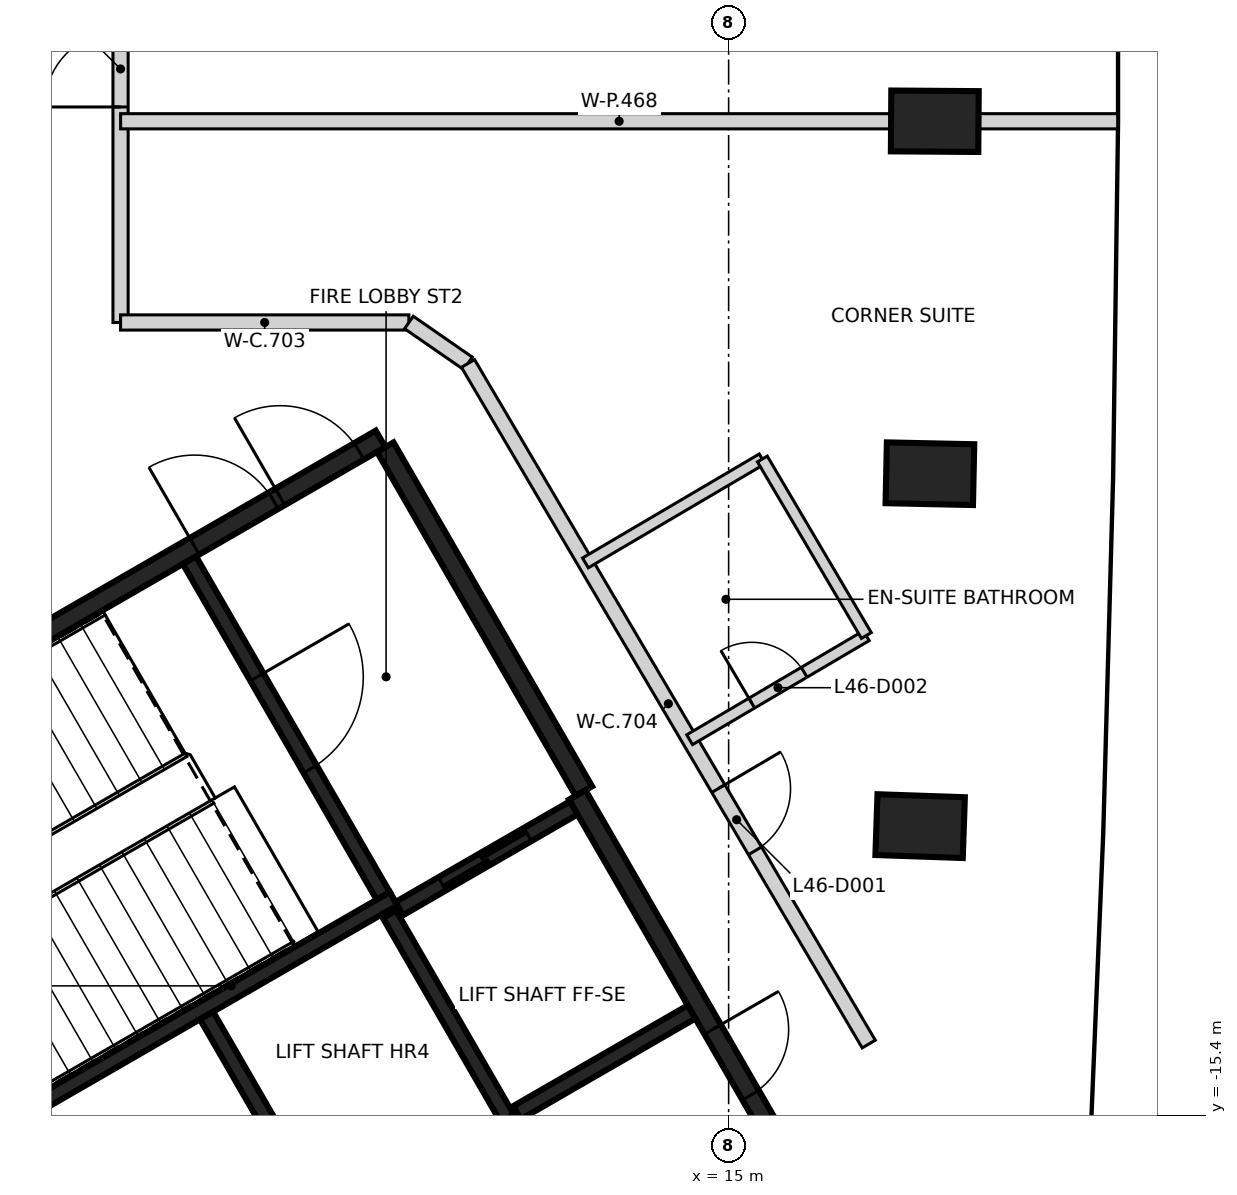
"""IFC4 building model, lengths in metres.
Left out: names, types, materials, properties, quantities, classifications, styles, units other than length and angle.
Written with IfcOpenShell. Run it as: python <this file> out.ifc"""

import sys

from ifc_helpers import new_model, si_unit, direction, frame, frame_2d, origin, origin_2d, place, context, subcontext, project, spatial, rectangle, extrude, element, fill, save


model = new_model("IFC4")
c1 = context("Model", 3, precision=1e-05, world=origin(), true_north=direction((0.0, 1.0)))
c2 = subcontext(c1, "Body", "Model", "MODEL_VIEW")
j1 = project(units=[si_unit("LENGTHUNIT", "METRE"), si_unit("PLANEANGLEUNIT", "RADIAN")], contexts=[c1])
p1 = place(None, origin())
s1 = spatial("IfcSite", under=j1, at=p1, CompositionType="ELEMENT")
p2 = place(p1, origin())
s2 = spatial("IfcBuilding", under=s1, at=p2, CompositionType="ELEMENT")
p3 = place(p2, frame((0.0, 0.0, 186.4)))
s3 = spatial("IfcBuildingStorey", under=s2, at=p3, CompositionType="ELEMENT", Elevation=186.4)
for number, where, z_axis, x_axis in (
    (1, (17.519, -11.592, -0.35), (0.0, 0.0, 1.0), (-0.999, 0.034, 0.0)),
    (2, (17.648, -6.956, -0.35), (0.0, 0.0, 1.0), (-1.0, 0.021, 0.0)),
    (3, (17.712, -2.319, -0.35), (0.0, 0.0, 1.0), (-1.0, 0.007, 0.0)),
):
    element("IfcColumn", number, at=place(p3, frame(where, z_axis=z_axis, x_axis=x_axis)), inside=s3, PredefinedType="COLUMN", context=c2, shape_type="SweptSolid", body=[
        extrude(rectangle(XDim=1.15, YDim=0.8, at=origin_2d()), origin(), (0.0, 0.0, 1.0), 3.6),
    ])
p4 = place(p3, frame((0.417, -12.273, 0.0), z_axis=(0.0, 0.0, 1.0), x_axis=(0.866021906294, 0.500006057782, 0.0)))
e4 = element("IfcWall", 4, at=p4, inside=s3, PredefinedType="SHEAR", context=c2, shape_type="SweptSolid", body=[
    extrude(rectangle(XDim=11.55, YDim=0.25, at=frame_2d((5.775, 0.0))), origin(), (0.0, 0.0, 1.0), 3.25),
])
p5 = place(p4, frame((10.025, 0.0, 0.0)))
e5 = element("IfcOpeningElement", 5, at=p5, cuts=e4, PredefinedType="OPENING", context=c2, shape_type="SweptSolid", body=[
    extrude(rectangle(XDim=1.2, YDim=2.1, at=frame_2d((0.6, 1.05))), frame((0.0, 0.135, 0.0), z_axis=(0.0, -1.0, 0.0), x_axis=(1.0, 0.0, 0.0)), (0.0, 0.0, 1.0), 0.27),
])
p6 = place(p4, frame((8.725, 0.0, 0.0)))
e6 = element("IfcOpeningElement", 6, at=p6, cuts=e4, PredefinedType="OPENING", context=c2, shape_type="SweptSolid", body=[
    extrude(rectangle(XDim=1.2, YDim=2.1, at=frame_2d((0.6, 1.05))), frame((0.0, 0.135, 0.0), z_axis=(0.0, -1.0, 0.0), x_axis=(1.0, 0.0, 0.0)), (0.0, 0.0, 1.0), 0.27),
])
p7 = place(p3, frame((13.008, -11.181, 0.0), z_axis=(0.0, 0.0, 1.0), x_axis=(0.500001955336, -0.866024274868, 0.0)))
e7 = element("IfcWall", 7, at=p7, inside=s3, PredefinedType="SHEAR", context=c2, shape_type="SweptSolid", body=[
    extrude(rectangle(XDim=6.125, YDim=0.25, at=frame_2d((3.062, 0.0))), origin(), (0.0, 0.0, 1.0), 3.25),
])
p8 = place(p7, frame((3.563, 0.0, 0.0)))
e8 = element("IfcOpeningElement", 8, at=p8, cuts=e7, PredefinedType="OPENING", context=c2, shape_type="SweptSolid", body=[
    extrude(rectangle(XDim=1.0, YDim=2.1, at=frame_2d((0.5, 1.05))), frame((0.0, 0.135, 0.0), z_axis=(0.0, -1.0, 0.0), x_axis=(1.0, 0.0, 0.0)), (0.0, 0.0, 1.0), 0.27),
])
p9 = place(p3, frame((10.483, -6.606, 0.0), z_axis=(0.0, 0.0, 1.0), x_axis=(0.49999885962, -0.866026062182, 0.0)))
e9 = element("IfcWall", 9, at=p9, inside=s3, PredefinedType="SHEAR", context=c2, shape_type="SweptSolid", body=[
    extrude(rectangle(XDim=5.225, YDim=0.25, at=frame_2d((2.612, 0.0))), origin(), (0.0, 0.0, 1.0), 3.25),
])
p10 = place(p3, frame((5.419, -15.534, 0.0), z_axis=(0.0, 0.0, 1.0), x_axis=(0.866029065029, 0.499993658486, 0.0)))
e10 = element("IfcWall", 10, at=p10, inside=s3, PredefinedType="SHEAR", context=c2, shape_type="SweptSolid", body=[
    extrude(rectangle(XDim=5.974, YDim=0.2, at=frame_2d((2.987, 0.0))), origin(), (0.0, 0.0, 1.0), 3.25),
])
p11 = place(p3, frame((7.01, -18.542, 0.0), z_axis=(0.0, 0.0, 1.0), x_axis=(0.866030299012, 0.499991521122, 0.0)))
e11 = element("IfcWall", 11, at=p11, inside=s3, PredefinedType="SHEAR", context=c2, shape_type="SweptSolid", body=[
    extrude(rectangle(XDim=6.1, YDim=0.2, at=frame_2d((3.05, 0.0))), origin(), (0.0, 0.0, 1.0), 3.25),
])
p12 = place(p11, frame((1.0, 0.0, 0.0)))
e12 = element("IfcOpeningElement", 12, at=p12, cuts=e11, PredefinedType="OPENING", context=c2, shape_type="SweptSolid", body=[
    extrude(rectangle(XDim=1.2, YDim=2.1, at=frame_2d((0.6, 1.05))), frame((0.0, 0.11, 0.0), z_axis=(0.0, -1.0, 0.0), x_axis=(1.0, 0.0, 0.0)), (0.0, 0.0, 1.0), 0.22),
])
p13 = place(p11, frame((3.982, 0.0, 0.0)))
e13 = element("IfcOpeningElement", 13, at=p13, cuts=e11, PredefinedType="OPENING", context=c2, shape_type="SweptSolid", body=[
    extrude(rectangle(XDim=1.2, YDim=2.1, at=frame_2d((0.6, 1.05))), frame((0.0, 0.11, 0.0), z_axis=(0.0, -1.0, 0.0), x_axis=(1.0, 0.0, 0.0)), (0.0, 0.0, 1.0), 0.22),
])
p14 = place(p3, frame((7.906, -8.094, 0.0), z_axis=(0.0, 0.0, 1.0), x_axis=(0.500027839223, -0.866009330205, 0.0)))
e14 = element("IfcWall", 14, at=p14, inside=s3, PredefinedType="SHEAR", context=c2, shape_type="SweptSolid", body=[
    extrude(rectangle(XDim=5.098, YDim=0.2, at=frame_2d((2.549, 0.0))), origin(), (0.0, 0.0, 1.0), 3.25),
])
p15 = place(p14, frame((1.774, 0.0, 0.0)))
e15 = element("IfcOpeningElement", 15, at=p15, cuts=e14, PredefinedType="OPENING", context=c2, shape_type="SweptSolid", body=[
    extrude(rectangle(XDim=1.4, YDim=2.1, at=frame_2d((0.7, 1.05))), frame((0.0, 0.11, 0.0), z_axis=(0.0, -1.0, 0.0), x_axis=(1.0, 0.0, 0.0)), (0.0, 0.0, 1.0), 0.22),
])
p16 = place(p3, frame((8.132, -14.084, 0.0), z_axis=(0.0, 0.0, 1.0), x_axis=(0.499997778408, -0.866026686418, 0.0)))
e16 = element("IfcWall", 16, at=p16, inside=s3, PredefinedType="SHEAR", context=c2, shape_type="SweptSolid", body=[
    extrude(rectangle(XDim=3.198, YDim=0.2, at=frame_2d((1.599, 0.0))), origin(), (0.0, 0.0, 1.0), 3.25),
])
p17 = place(p3, frame((12.088, -15.437, 0.0), z_axis=(0.0, 0.0, 1.0), x_axis=(-0.500026960575, 0.86600983753, 0.0)))
e17 = element("IfcWall", 17, at=p17, inside=s3, PredefinedType="SHEAR", context=c2, shape_type="SweptSolid", body=[
    extrude(rectangle(XDim=3.1, YDim=0.2, at=frame_2d((1.55, 0.0))), origin(), (0.0, 0.0, 1.0), 3.25),
])
p18 = place(p3, frame((10.666, -12.678, 0.0), z_axis=(0.0, 0.0, 1.0), x_axis=(0.866018407898, 0.500012117035, 0.0)))
e18 = element("IfcWall", 18, at=p18, inside=s3, PredefinedType="SHEAR", context=c2, shape_type="SweptSolid", body=[
    extrude(rectangle(XDim=2.651, YDim=0.2, at=frame_2d((1.325, 0.0))), origin(), (0.0, 0.0, 1.0), 3.25),
])
p19 = place(p18, frame((0.652, 0.0, 0.0)))
e19 = element("IfcOpeningElement", 19, at=p19, cuts=e18, PredefinedType="OPENING", context=c2, shape_type="SweptSolid", body=[
    extrude(rectangle(XDim=1.3, YDim=2.1, at=frame_2d((0.65, 1.05))), frame((0.0, 0.11, 0.0), z_axis=(0.0, -1.0, 0.0), x_axis=(1.0, 0.0, 0.0)), (0.0, 0.0, 1.0), 0.22),
])
p20 = place(p3, frame((14.512, -14.037, 0.0), z_axis=(0.0, 0.0, 1.0), x_axis=(-0.866018407898, -0.500012117035, 0.0)))
e20 = element("IfcWall", 20, at=p20, inside=s3, PredefinedType="SHEAR", context=c2, shape_type="SweptSolid", body=[
    extrude(rectangle(XDim=2.651, YDim=0.2, at=frame_2d((1.325, 0.0))), origin(), (0.0, 0.0, 1.0), 3.25),
])
p21 = place(p3, frame((7.0, -4.966, 0.0), z_axis=(0.0, 0.0, 1.0), x_axis=(0.0, 1.0, 0.0)))
e21 = element("IfcWall", 21, at=p21, inside=s3, PredefinedType="PARTITIONING", context=c2, shape_type="SweptSolid", body=[
    extrude(rectangle(XDim=13.225, YDim=0.2, at=frame_2d((6.612, 0.0))), origin(), (0.0, 0.0, 1.0), 3.25),
])
p22 = place(p21, frame((2.835, 0.0, 0.0)))
e22 = element("IfcOpeningElement", 22, at=p22, cuts=e21, PredefinedType="OPENING", context=c2, shape_type="SweptSolid", body=[
    extrude(rectangle(XDim=1.0, YDim=2.1, at=frame_2d((0.5, 1.05))), frame((0.0, 0.11, 0.0), z_axis=(0.0, -1.0, 0.0), x_axis=(1.0, 0.0, 0.0)), (0.0, 0.0, 1.0), 0.22),
])
p23 = place(p21, frame((12.045, 0.0, 0.0)))
e23 = element("IfcOpeningElement", 23, at=p23, cuts=e21, PredefinedType="OPENING", context=c2, shape_type="SweptSolid", body=[
    extrude(rectangle(XDim=0.95, YDim=2.1, at=frame_2d((0.475, 1.05))), frame((0.0, 0.11, 0.0), z_axis=(0.0, -1.0, 0.0), x_axis=(1.0, 0.0, 0.0)), (0.0, 0.0, 1.0), 0.22),
])
p24 = place(p3, frame((7.0, -4.966, 0.0), z_axis=(0.0, 0.0, 1.0), x_axis=(1.0, 0.0, 0.0)))
e24 = element("IfcWall", 24, at=p24, inside=s3, PredefinedType="PARTITIONING", context=c2, shape_type="SweptSolid", body=[
    extrude(rectangle(XDim=3.793, YDim=0.2, at=frame_2d((1.896, 0.0))), origin(), (0.0, 0.0, 1.0), 3.25),
])
p25 = place(p3, frame((10.794, -4.966, 0.0), z_axis=(0.0, 0.0, 1.0), x_axis=(0.822266583859, -0.569102508401, 0.0)))
e25 = element("IfcWall", 25, at=p25, inside=s3, PredefinedType="PARTITIONING", context=c2, shape_type="SweptSolid", body=[
    extrude(rectangle(XDim=0.945, YDim=0.2, at=frame_2d((0.473, 0.0))), origin(), (0.0, 0.0, 1.0), 3.25),
])
p26 = place(p3, frame((11.571, -5.505, 0.0), z_axis=(0.0, 0.0, 1.0), x_axis=(0.507402039651, -0.861709446483, 0.0)))
e26 = element("IfcWall", 26, at=p26, inside=s3, PredefinedType="PARTITIONING", context=c2, shape_type="SweptSolid", body=[
    extrude(rectangle(XDim=10.391, YDim=0.2, at=frame_2d((5.196, 0.0))), origin(), (0.0, 0.0, 1.0), 3.25),
])
p27 = place(p26, frame((6.491, 0.0, 0.0)))
e27 = element("IfcOpeningElement", 27, at=p27, cuts=e26, PredefinedType="OPENING", context=c2, shape_type="SweptSolid", body=[
    extrude(rectangle(XDim=0.95, YDim=2.1, at=frame_2d((0.475, 1.05))), frame((0.0, 0.11, 0.0), z_axis=(0.0, -1.0, 0.0), x_axis=(1.0, 0.0, 0.0)), (0.0, 0.0, 1.0), 0.22),
])
p28 = place(p3, frame((7.001, -2.319, 0.0), z_axis=(0.0, 0.0, 1.0), x_axis=(1.0, 0.0, 0.0)))
e28 = element("IfcWall", 28, at=p28, inside=s3, PredefinedType="PARTITIONING", context=c2, shape_type="SweptSolid", body=[
    extrude(rectangle(XDim=13.117, YDim=0.2, at=frame_2d((6.559, 0.0))), origin(), (0.0, 0.0, 1.0), 3.25),
])
p29 = place(p3, frame((13.116, -8.129, 0.0), z_axis=(0.0, 0.0, 1.0), x_axis=(0.861885352062, 0.507103184669, 0.0)))
e29 = element("IfcWall", 29, at=p29, inside=s3, PredefinedType="PARTITIONING", context=c2, shape_type="SweptSolid", body=[
    extrude(rectangle(XDim=2.698, YDim=0.15, at=frame_2d((1.349, 0.0))), origin(), (0.0, 0.0, 1.0), 3.25),
])
p30 = place(p3, frame((14.487, -10.455, 0.0), z_axis=(0.0, 0.0, 1.0), x_axis=(0.861752634979, 0.507328686461, 0.0)))
e30 = element("IfcWall", 30, at=p30, inside=s3, PredefinedType="PARTITIONING", context=c2, shape_type="SweptSolid", body=[
    extrude(rectangle(XDim=2.697, YDim=0.15, at=frame_2d((1.348, 0.0))), origin(), (0.0, 0.0, 1.0), 3.25),
])
p31 = place(p30, frame((0.948, 0.0, 0.0)))
e31 = element("IfcOpeningElement", 31, at=p31, cuts=e30, PredefinedType="OPENING", context=c2, shape_type="SweptSolid", body=[
    extrude(rectangle(XDim=0.8, YDim=2.1, at=frame_2d((0.4, 1.05))), frame((0.0, 0.085, 0.0), z_axis=(0.0, -1.0, 0.0), x_axis=(1.0, 0.0, 0.0)), (0.0, 0.0, 1.0), 0.17),
])
p32 = place(p3, frame((15.444, -6.762, 0.0), z_axis=(0.0, 0.0, 1.0), x_axis=(0.507578234334, -0.861605673165, 0.0)))
e32 = element("IfcWall", 32, at=p32, inside=s3, PredefinedType="PARTITIONING", context=c2, shape_type="SweptSolid", body=[
    extrude(rectangle(XDim=2.695, YDim=0.15, at=frame_2d((1.348, 0.0))), origin(), (0.0, 0.0, 1.0), 3.25),
])
p33 = place(p19, origin())
e33 = element("IfcDoor", 33, at=p33, inside=s3, OperationType="SLIDING_TO_RIGHT", PredefinedType="DOOR", context=c2, shape_type="SweptSolid", body=[
    extrude(rectangle(XDim=1.3, YDim=2.1, at=frame_2d((0.65, 1.05))), frame((0.0, 0.025, 0.0), z_axis=(0.0, -1.0, 0.0), x_axis=(1.0, 0.0, 0.0)), (0.0, 0.0, 1.0), 0.05),
])
fill(e19, e33)
p34 = place(p8, origin())
e34 = element("IfcDoor", 34, at=p34, inside=s3, OperationType="SINGLE_SWING_LEFT", PredefinedType="DOOR", context=c2, shape_type="SweptSolid", body=[
    extrude(rectangle(XDim=1.0, YDim=2.1, at=frame_2d((0.5, 1.05))), frame((0.0, 0.025, 0.0), z_axis=(0.0, -1.0, 0.0), x_axis=(1.0, 0.0, 0.0)), (0.0, 0.0, 1.0), 0.05),
])
fill(e8, e34)
p35 = place(p5, origin())
e35 = element("IfcDoor", 35, at=p35, inside=s3, OperationType="SINGLE_SWING_LEFT", PredefinedType="DOOR", context=c2, shape_type="SweptSolid", body=[
    extrude(rectangle(XDim=1.2, YDim=2.1, at=frame_2d((0.6, 1.05))), frame((0.0, 0.025, 0.0), z_axis=(0.0, -1.0, 0.0), x_axis=(1.0, 0.0, 0.0)), (0.0, 0.0, 1.0), 0.05),
])
fill(e5, e35)
p36 = place(p6, origin())
e36 = element("IfcDoor", 36, at=p36, inside=s3, OperationType="SINGLE_SWING_RIGHT", PredefinedType="DOOR", context=c2, shape_type="SweptSolid", body=[
    extrude(rectangle(XDim=1.2, YDim=2.1, at=frame_2d((0.6, 1.05))), frame((0.0, 0.025, 0.0), z_axis=(0.0, -1.0, 0.0), x_axis=(1.0, 0.0, 0.0)), (0.0, 0.0, 1.0), 0.05),
])
fill(e6, e36)
p37 = place(p15, origin())
e37 = element("IfcDoor", 37, at=p37, inside=s3, OperationType="SINGLE_SWING_RIGHT", PredefinedType="DOOR", context=c2, shape_type="SweptSolid", body=[
    extrude(rectangle(XDim=1.4, YDim=2.1, at=frame_2d((0.7, 1.05))), frame((0.0, 0.025, 0.0), z_axis=(0.0, -1.0, 0.0), x_axis=(1.0, 0.0, 0.0)), (0.0, 0.0, 1.0), 0.05),
])
fill(e15, e37)
p38 = place(p27, origin())
e38 = element("IfcDoor", 38, at=p38, inside=s3, OperationType="SINGLE_SWING_LEFT", PredefinedType="DOOR", context=c2, shape_type="SweptSolid", body=[
    extrude(rectangle(XDim=0.95, YDim=2.1, at=frame_2d((0.475, 1.05))), frame((0.0, 0.025, 0.0), z_axis=(0.0, -1.0, 0.0), x_axis=(1.0, 0.0, 0.0)), (0.0, 0.0, 1.0), 0.05),
])
fill(e27, e38)
p39 = place(p31, frame((0.8, 0.0, 0.0), z_axis=(0.0, 0.0, 1.0), x_axis=(-1.0, 0.0, 0.0)))
e39 = element("IfcDoor", 39, at=p39, inside=s3, OperationType="SINGLE_SWING_LEFT", PredefinedType="DOOR", context=c2, shape_type="SweptSolid", body=[
    extrude(rectangle(XDim=0.8, YDim=2.1, at=frame_2d((0.4, 1.05))), frame((0.0, 0.025, 0.0), z_axis=(0.0, -1.0, 0.0), x_axis=(1.0, 0.0, 0.0)), (0.0, 0.0, 1.0), 0.05),
])
fill(e31, e39)
p40 = place(p22, frame((1.0, 0.0, 0.0), z_axis=(0.0, 0.0, 1.0), x_axis=(-1.0, 0.0, 0.0)))
e40 = element("IfcDoor", 40, at=p40, inside=s3, OperationType="SINGLE_SWING_LEFT", PredefinedType="DOOR", context=c2, shape_type="SweptSolid", body=[
    extrude(rectangle(XDim=1.0, YDim=2.1, at=frame_2d((0.5, 1.05))), frame((0.0, 0.025, 0.0), z_axis=(0.0, -1.0, 0.0), x_axis=(1.0, 0.0, 0.0)), (0.0, 0.0, 1.0), 0.05),
])
fill(e22, e40)
save(model, sys.argv[1])
